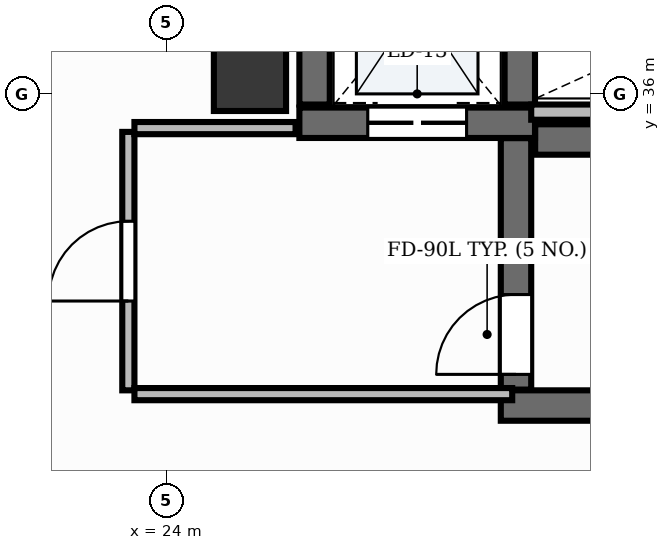
"""IFC4 building model, lengths in metres.
Left out: names, types, materials, properties, quantities, classifications, styles, units other than length and angle.
Written with IfcOpenShell. Run it as: python <this file> out.ifc"""

import sys

from ifc_helpers import new_model, si_unit, direction, frame, frame_2d, origin, origin_2d, place, context, subcontext, project, spatial, rectangle, extrude, element, fill, save


model = new_model("IFC4")
c1 = context("Model", 3, precision=1e-05, world=origin(), true_north=direction((0.0, 1.0)))
c2 = subcontext(c1, "Body", "Model", "MODEL_VIEW")
j1 = project(units=[si_unit("LENGTHUNIT", "METRE"), si_unit("PLANEANGLEUNIT", "RADIAN")], contexts=[c1])
p1 = place(None, origin())
s1 = spatial("IfcSite", under=j1, at=p1, CompositionType="ELEMENT")
p2 = place(p1, origin())
s2 = spatial("IfcBuilding", under=s1, at=p2, CompositionType="ELEMENT")
p3 = place(p2, frame((0.0, 0.0, 243.6)))
s3 = spatial("IfcBuildingStorey", under=s2, at=p3, CompositionType="ELEMENT", Elevation=243.6)
p4 = place(p3, frame((28.852, 35.4, 0.0), z_axis=(0.0, 0.0, 1.0), x_axis=(1.0, 0.0, 0.0)))
e1 = element("IfcWall", 1, at=p4, inside=s3, PredefinedType="SHEAR", context=c2, shape_type="SweptSolid", body=[
    extrude(rectangle(XDim=8.198, YDim=0.4, at=frame_2d((4.099, 0.0))), origin(), (0.0, 0.0, 1.0), 3.9),
])
p5 = place(p3, frame((28.4, 31.9, 0.0), z_axis=(0.0, 0.0, 1.0), x_axis=(1.0, 0.0, 0.0)))
e2 = element("IfcWall", 2, at=p5, inside=s3, PredefinedType="SHEAR", context=c2, shape_type="SweptSolid", body=[
    extrude(rectangle(XDim=8.65, YDim=0.4, at=frame_2d((4.325, 0.0))), origin(), (0.0, 0.0, 1.0), 3.9),
])
p6 = place(p3, frame((28.6, 32.11, 0.0), z_axis=(0.0, 0.0, 1.0), x_axis=(0.0, 1.0, 0.0)))
e3 = element("IfcWall", 3, at=p6, inside=s3, PredefinedType="SHEAR", context=c2, shape_type="SweptSolid", body=[
    extrude(rectangle(XDim=3.308, YDim=0.4, at=frame_2d((1.654, 0.0))), origin(), (0.0, 0.0, 1.0), 3.9),
])
p7 = place(p6, frame((0.2, 0.0, 0.0)))
e4 = element("IfcOpeningElement", 4, at=p7, cuts=e3, PredefinedType="OPENING", context=c2, shape_type="SweptSolid", body=[
    extrude(rectangle(XDim=1.05, YDim=2.15, at=frame_2d((0.525, 1.075))), frame((0.0, 0.215, 0.0), z_axis=(0.0, -1.0, 0.0), x_axis=(1.0, 0.0, 0.0)), (0.0, 0.0, 1.0), 0.43),
])
p8 = place(p3, frame((25.75, 35.62, 0.0), z_axis=(0.0, 0.0, 1.0), x_axis=(1.0, 0.0, 0.0)))
e5 = element("IfcWall", 5, at=p8, inside=s3, PredefinedType="SHEAR", context=c2, shape_type="SweptSolid", body=[
    extrude(rectangle(XDim=3.1, YDim=0.4, at=frame_2d((1.55, 0.0))), origin(), (0.0, 0.0, 1.0), 3.9),
])
p9 = place(p8, frame((0.9, 0.0, 0.0)))
e6 = element("IfcOpeningElement", 6, at=p9, cuts=e5, PredefinedType="OPENING", context=c2, shape_type="SweptSolid", body=[
    extrude(rectangle(XDim=1.3, YDim=2.2, at=frame_2d((0.65, 1.1))), frame((0.0, 0.215, 0.0), z_axis=(0.0, -1.0, 0.0), x_axis=(1.0, 0.0, 0.0)), (0.0, 0.0, 1.0), 0.43),
])
for number, where, z_axis, x_axis in (
    (7, (25.95, 35.86, 0.0), (0.0, 0.0, 1.0), (0.0, 1.0, 0.0)),
    (8, (28.65, 35.86, 0.0), (0.0, 0.0, 1.0), (0.0, 1.0, 0.0)),
):
    element("IfcWall", number, at=place(p3, frame(where, z_axis=z_axis, x_axis=x_axis)), inside=s3, PredefinedType="SHEAR", context=c2, shape_type="SweptSolid", body=[
        extrude(rectangle(XDim=2.7, YDim=0.4, at=frame_2d((1.35, 0.0))), origin(), (0.0, 0.0, 1.0), 3.9),
    ])
p10 = place(p3, frame((25.1, 36.25, -0.0), z_axis=(0.0, 0.0, 1.0), x_axis=(1.0, 0.0, 0.0)))
e9 = element("IfcColumn", 9, at=p10, inside=s3, PredefinedType="PILASTER", context=c2, shape_type="SweptSolid", body=[
    extrude(rectangle(XDim=0.95, YDim=0.95, at=origin_2d()), origin(), (0.0, 0.0, 1.0), 3.901),
])
p11 = place(p3, frame((28.8, 35.76, 0.0), z_axis=(0.0, 0.0, 1.0), x_axis=(1.0, 0.0, 0.0)))
e10 = element("IfcWall", 10, at=p11, inside=s3, PredefinedType="PARTITIONING", context=c2, shape_type="SweptSolid", body=[
    extrude(rectangle(XDim=4.57, YDim=0.2, at=frame_2d((2.285, 0.0))), origin(), (0.0, 0.0, 1.0), 2.91),
])
p12 = place(p3, frame((23.5, 32.1, 0.0), z_axis=(0.0, 0.0, 1.0), x_axis=(0.0, 1.0, 0.0)))
e11 = element("IfcWall", 11, at=p12, inside=s3, PredefinedType="PARTITIONING", context=c2, shape_type="SweptSolid", body=[
    extrude(rectangle(XDim=3.4, YDim=0.16, at=frame_2d((1.7, 0.0))), origin(), (0.0, 0.0, 1.0), 2.91),
])
p13 = place(p12, frame((1.175, 0.0, 0.0)))
e12 = element("IfcOpeningElement", 12, at=p13, cuts=e11, PredefinedType="OPENING", context=c2, shape_type="SweptSolid", body=[
    extrude(rectangle(XDim=1.05, YDim=2.15, at=frame_2d((0.525, 1.075))), frame((0.0, 0.095, 0.0), z_axis=(0.0, -1.0, 0.0), x_axis=(1.0, 0.0, 0.0)), (0.0, 0.0, 1.0), 0.19),
])
p14 = place(p3, frame((23.58, 32.05, 0.0), z_axis=(0.0, 0.0, 1.0), x_axis=(1.0, 0.0, 0.0)))
e13 = element("IfcWall", 13, at=p14, inside=s3, PredefinedType="PARTITIONING", context=c2, shape_type="SweptSolid", body=[
    extrude(rectangle(XDim=4.97, YDim=0.16, at=frame_2d((2.485, 0.0))), origin(), (0.0, 0.0, 1.0), 2.91),
])
p15 = place(p3, frame((23.58, 35.55, 0.0), z_axis=(0.0, 0.0, 1.0), x_axis=(1.0, 0.0, 0.0)))
e14 = element("IfcWall", 14, at=p15, inside=s3, PredefinedType="PARTITIONING", context=c2, shape_type="SweptSolid", body=[
    extrude(rectangle(XDim=2.12, YDim=0.16, at=frame_2d((1.06, 0.0))), origin(), (0.0, 0.0, 1.0), 2.91),
])
p16 = place(p7, origin())
e15 = element("IfcDoor", 15, at=p16, inside=s3, OperationType="SINGLE_SWING_LEFT", PredefinedType="DOOR", context=c2, shape_type="SweptSolid", body=[
    extrude(rectangle(XDim=1.05, YDim=2.15, at=frame_2d((0.525, 1.075))), frame((0.0, 0.025, 0.0), z_axis=(0.0, -1.0, 0.0), x_axis=(1.0, 0.0, 0.0)), (0.0, 0.0, 1.0), 0.05),
])
fill(e4, e15)
p17 = place(p9, origin())
e16 = element("IfcDoor", 16, at=p17, inside=s3, OperationType="DOUBLE_DOOR_SLIDING", PredefinedType="DOOR", context=c2, shape_type="SweptSolid", body=[
    extrude(rectangle(XDim=1.3, YDim=2.2, at=frame_2d((0.65, 1.1))), frame((0.0, 0.025, 0.0), z_axis=(0.0, -1.0, 0.0), x_axis=(1.0, 0.0, 0.0)), (0.0, 0.0, 1.0), 0.05),
])
fill(e6, e16)
p18 = place(p13, origin())
e17 = element("IfcDoor", 17, at=p18, inside=s3, OperationType="SINGLE_SWING_LEFT", PredefinedType="DOOR", context=c2, shape_type="SweptSolid", body=[
    extrude(rectangle(XDim=1.05, YDim=2.15, at=frame_2d((0.525, 1.075))), frame((0.0, 0.025, 0.0), z_axis=(0.0, -1.0, 0.0), x_axis=(1.0, 0.0, 0.0)), (0.0, 0.0, 1.0), 0.05),
])
fill(e12, e17)
save(model, sys.argv[1])
